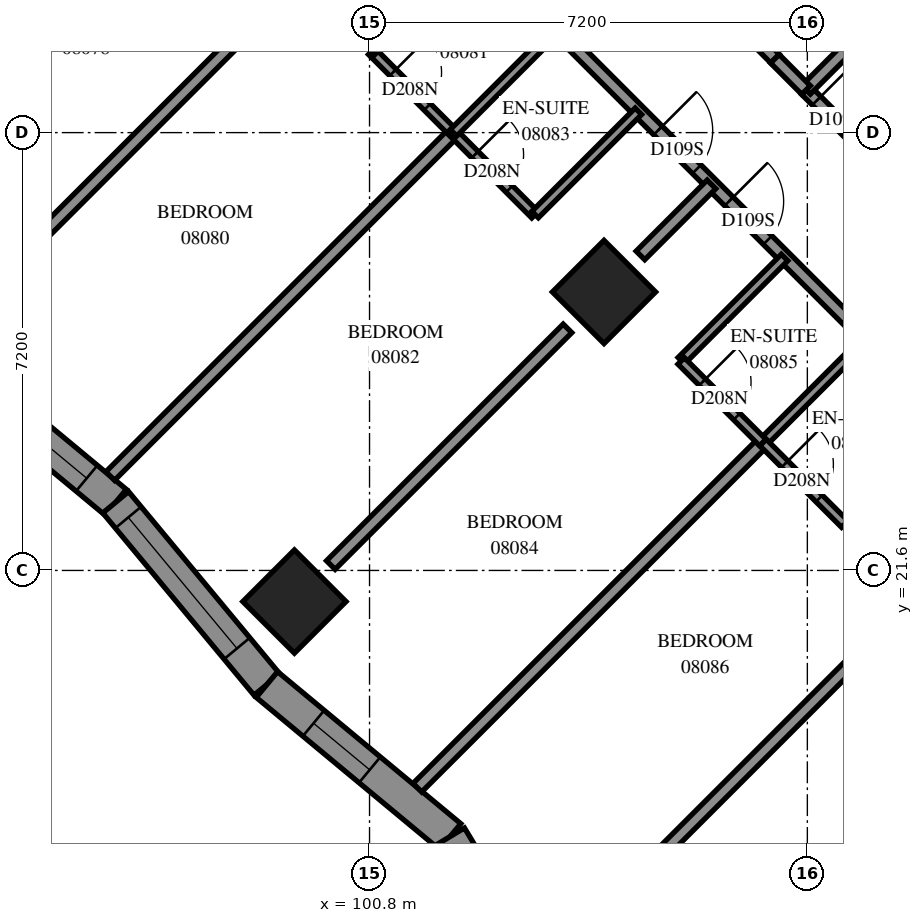
"""IFC4 building model, lengths in metres.
Left out: names, types, materials, properties, quantities, classifications, styles, units other than length and angle.
Written with IfcOpenShell. Run it as: python <this file> out.ifc"""

import sys

from ifc_helpers import new_model, si_unit, direction, frame, frame_2d, origin, origin_2d, place, context, subcontext, project, spatial, polyline, rectangle, outline, extrude, element, fill, save


model = new_model("IFC4")
c1 = context("Model", 3, precision=1e-05, world=origin(), true_north=direction((0.0, 1.0)))
c2 = subcontext(c1, "Body", "Model", "MODEL_VIEW")
j1 = project(units=[si_unit("LENGTHUNIT", "METRE"), si_unit("PLANEANGLEUNIT", "RADIAN")], contexts=[c1])
p1 = place(None, origin())
s1 = spatial("IfcSite", under=j1, at=p1, CompositionType="ELEMENT")
p2 = place(p1, origin())
s2 = spatial("IfcBuilding", under=s1, at=p2, CompositionType="ELEMENT")
p3 = place(p2, frame((0.0, 0.0, 33.8)))
s3 = spatial("IfcBuildingStorey", under=s2, at=p3, CompositionType="ELEMENT", Elevation=33.8)
for number, where, z_axis, x_axis in (
    (1, (104.656, 26.18, 0.0), (0.0, 0.0, 1.0), (0.707, -0.707, 0.0)),
    (2, (99.565, 21.088, 0.0), (0.0, 0.0, 1.0), (0.707, -0.707, 0.0)),
):
    element("IfcColumn", number, at=place(p3, frame(where, z_axis=z_axis, x_axis=x_axis)), inside=s3, PredefinedType="COLUMN", context=c2, shape_type="SweptSolid", body=[
        extrude(rectangle(XDim=1.2, YDim=1.2, at=origin_2d()), origin(), (0.0, 0.0, 1.0), 3.1),
    ])
p4 = place(p3, frame((93.629, 25.207, 0.0), z_axis=(0.0, 0.0, 1.0), x_axis=(0.7696065296, -0.6385184333, 0.0)))
e3 = element("IfcWall", 3, at=p4, inside=s3, PredefinedType="SOLIDWALL", context=c2, shape_type="SweptSolid", body=[
    extrude(outline(polyline([(-0.026, -0.275), (3.869, -0.275), (3.92, 0.275), (0.026, 0.275), (-0.026, -0.275)])), origin(), (0.0, 0.0, 1.0), 3.1),
])
p5 = place(p4, frame((0.475, 0.0, 0.5)))
e4 = element("IfcOpeningElement", 4, at=p5, cuts=e3, PredefinedType="OPENING", context=c2, shape_type="SweptSolid", body=[
    extrude(rectangle(XDim=2.8, YDim=2.45, at=frame_2d((1.4, 1.225))), frame((0.0, 0.285, 0.0), z_axis=(0.0, -1.0, 0.0), x_axis=(1.0, 0.0, 0.0)), (0.0, 0.0, 1.0), 0.57),
])
p6 = place(p3, frame((96.626, 22.721, 0.0), z_axis=(0.0, 0.0, 1.0), x_axis=(0.6385032238, -0.7696191482, 0.0)))
e5 = element("IfcWall", 5, at=p6, inside=s3, PredefinedType="SOLIDWALL", context=c2, shape_type="SweptSolid", body=[
    extrude(outline(polyline([(0.026, -0.275), (3.92, -0.275), (3.869, 0.275), (-0.026, 0.275), (0.026, -0.275)])), origin(), (0.0, 0.0, 1.0), 3.1),
])
p7 = place(p6, frame((0.323, 0.0, 0.5)))
e6 = element("IfcOpeningElement", 6, at=p7, cuts=e5, PredefinedType="OPENING", context=c2, shape_type="SweptSolid", body=[
    extrude(rectangle(XDim=2.8, YDim=2.45, at=frame_2d((1.4, 1.225))), frame((0.0, 0.285, 0.0), z_axis=(0.0, -1.0, 0.0), x_axis=(1.0, 0.0, 0.0)), (0.0, 0.0, 1.0), 0.57),
])
p8 = place(p3, frame((99.112, 19.724, 0.0), z_axis=(0.0, 0.0, 1.0), x_axis=(0.7696116293, -0.6385122866, 0.0)))
e7 = element("IfcWall", 7, at=p8, inside=s3, PredefinedType="SOLIDWALL", context=c2, shape_type="SweptSolid", body=[
    extrude(outline(polyline([(-0.026, -0.275), (3.869, -0.275), (3.962, 0.275), (0.026, 0.275), (-0.026, -0.275)])), origin(), (0.0, 0.0, 1.0), 3.1),
])
p9 = place(p8, frame((0.997, 0.0, 0.5)))
e8 = element("IfcOpeningElement", 8, at=p9, cuts=e7, PredefinedType="OPENING", context=c2, shape_type="SweptSolid", body=[
    extrude(rectangle(XDim=1.2, YDim=2.45, at=frame_2d((0.6, 1.225))), frame((0.0, 0.285, 0.0), z_axis=(0.0, -1.0, 0.0), x_axis=(1.0, 0.0, 0.0)), (0.0, 0.0, 1.0), 0.57),
])
p10 = place(p3, frame((102.125, 17.224, 0.0), z_axis=(0.0, 0.0, 1.0), x_axis=(0.5162476894, -0.8564393284, 0.0)))
e9 = element("IfcWall", 9, at=p10, inside=s3, PredefinedType="SOLIDWALL", context=c2, shape_type="SweptSolid", body=[
    extrude(outline(polyline([(0.047, -0.275), (4.042, -0.275), (3.592, 0.275), (-0.047, 0.275), (0.047, -0.275)])), origin(), (0.0, 0.0, 1.0), 3.1),
])
p11 = place(p10, frame((0.869, 0.0, 0.5)))
e10 = element("IfcOpeningElement", 10, at=p11, cuts=e9, PredefinedType="OPENING", context=c2, shape_type="SweptSolid", body=[
    extrude(rectangle(XDim=1.2, YDim=2.45, at=frame_2d((0.6, 1.225))), frame((0.0, 0.285, 0.0), z_axis=(0.0, -1.0, 0.0), x_axis=(1.0, 0.0, 0.0)), (0.0, 0.0, 1.0), 0.57),
])
p12 = place(p3, frame((102.609, 31.769, 0.0), z_axis=(0.0, 0.0, 1.0), x_axis=(0.7071067812, -0.7071067812, 0.0)))
e11 = element("IfcWall", 11, at=p12, inside=s3, PredefinedType="PARTITIONING", context=c2, shape_type="SweptSolid", body=[
    extrude(rectangle(XDim=10.723, YDim=0.2, at=frame_2d((5.361, 0.0))), origin(), (0.0, 0.0, 1.0), 3.1),
])
p13 = place(p12, frame((4.15, 0.0, 0.0)))
e12 = element("IfcOpeningElement", 12, at=p13, cuts=e11, PredefinedType="OPENING", context=c2, shape_type="SweptSolid", body=[
    extrude(rectangle(XDim=0.9, YDim=2.1, at=frame_2d((0.45, 1.05))), frame((0.0, 0.11, 0.0), z_axis=(0.0, -1.0, 0.0), x_axis=(1.0, 0.0, 0.0)), (0.0, 0.0, 1.0), 0.22),
])
p14 = place(p12, frame((5.8, 0.0, 0.0)))
e13 = element("IfcOpeningElement", 13, at=p14, cuts=e11, PredefinedType="OPENING", context=c2, shape_type="SweptSolid", body=[
    extrude(rectangle(XDim=0.9, YDim=2.1, at=frame_2d((0.45, 1.05))), frame((0.0, 0.11, 0.0), z_axis=(0.0, -1.0, 0.0), x_axis=(1.0, 0.0, 0.0)), (0.0, 0.0, 1.0), 0.22),
])
p15 = place(p3, frame((101.587, 18.028, 0.0), z_axis=(0.0, 0.0, 1.0), x_axis=(0.7072374716, 0.7069760666, 0.0)))
e14 = element("IfcWall", 14, at=p15, inside=s3, PredefinedType="PARTITIONING", context=c2, shape_type="SweptSolid", body=[
    extrude(rectangle(XDim=8.034, YDim=0.2, at=frame_2d((4.017, 0.0))), origin(), (0.0, 0.0, 1.0), 3.1),
])
p16 = place(p3, frame((96.536, 23.152, 0.0), z_axis=(0.0, 0.0, 1.0), x_axis=(0.7071067812, 0.7071067812, 0.0)))
e15 = element("IfcWall", 15, at=p16, inside=s3, PredefinedType="PARTITIONING", context=c2, shape_type="SweptSolid", body=[
    extrude(rectangle(XDim=7.983, YDim=0.2, at=frame_2d((3.991, 0.0))), origin(), (0.0, 0.0, 1.0), 3.1),
])
p17 = place(p3, frame((91.46, 28.252, 0.0), z_axis=(0.0, 0.0, 1.0), x_axis=(0.7072323194, 0.7069812206, 0.0)))
e16 = element("IfcWall", 16, at=p17, inside=s3, PredefinedType="PARTITIONING", context=c2, shape_type="SweptSolid", body=[
    extrude(rectangle(XDim=7.965, YDim=0.2, at=frame_2d((3.982, 0.0))), origin(), (0.0, 0.0, 1.0), 3.1),
])
p18 = place(p3, frame((107.977, 29.499, 0.0), z_axis=(0.0, 0.0, 1.0), x_axis=(0.7071067812, -0.7071067812, 0.0)))
e17 = element("IfcWall", 17, at=p18, inside=s3, PredefinedType="PARTITIONING", context=c2, shape_type="SweptSolid", body=[
    extrude(rectangle(XDim=7.198, YDim=0.2, at=frame_2d((3.599, 0.0))), origin(), (0.0, 0.0, 1.0), 3.1),
])
p19 = place(p18, frame((0.247, 0.0, 0.0)))
e18 = element("IfcOpeningElement", 18, at=p19, cuts=e17, PredefinedType="OPENING", context=c2, shape_type="SweptSolid", body=[
    extrude(rectangle(XDim=0.9, YDim=2.1, at=frame_2d((0.45, 1.05))), frame((0.0, 0.11, 0.0), z_axis=(0.0, -1.0, 0.0), x_axis=(1.0, 0.0, 0.0)), (0.0, 0.0, 1.0), 0.22),
])
p20 = place(p18, frame((5.899, 0.0, 0.0)))
e19 = element("IfcOpeningElement", 19, at=p20, cuts=e17, PredefinedType="OPENING", context=c2, shape_type="SweptSolid", body=[
    extrude(rectangle(XDim=0.9, YDim=2.1, at=frame_2d((0.45, 1.05))), frame((0.0, 0.11, 0.0), z_axis=(0.0, -1.0, 0.0), x_axis=(1.0, 0.0, 0.0)), (0.0, 0.0, 1.0), 0.22),
])
p21 = place(p3, frame((105.255, 16.599, 0.0), z_axis=(0.0, 0.0, 1.0), x_axis=(0.7071067812, 0.7071067812, 0.0)))
e20 = element("IfcWall", 20, at=p21, inside=s3, PredefinedType="PARTITIONING", context=c2, shape_type="SweptSolid", body=[
    extrude(rectangle(XDim=5.504, YDim=0.2, at=frame_2d((2.752, 0.0))), origin(), (0.0, 0.0, 1.0), 2.6),
])
p22 = place(p3, frame((100.163, 21.689, 0.0), z_axis=(0.0, 0.0, 1.0), x_axis=(0.7071067812, 0.7071067812, 0.0)))
e21 = element("IfcWall", 21, at=p22, inside=s3, PredefinedType="PARTITIONING", context=c2, shape_type="SweptSolid", body=[
    extrude(rectangle(XDim=5.504, YDim=0.2, at=frame_2d((2.752, 0.0))), origin(), (0.0, 0.0, 1.0), 3.1),
])
p23 = place(p3, frame((95.073, 26.781, 0.0), z_axis=(0.0, 0.0, 1.0), x_axis=(0.7071067812, 0.7071067812, 0.0)))
e22 = element("IfcWall", 22, at=p23, inside=s3, PredefinedType="PARTITIONING", context=c2, shape_type="SweptSolid", body=[
    extrude(rectangle(XDim=5.501, YDim=0.2, at=frame_2d((2.751, 0.0))), origin(), (0.0, 0.0, 1.0), 3.1),
])
p24 = place(p3, frame((100.836, 30.138, 0.0), z_axis=(0.0, 0.0, 1.0), x_axis=(0.7065802685, -0.7076329021, 0.0)))
e23 = element("IfcWall", 23, at=p24, inside=s3, PredefinedType="PARTITIONING", context=c2, shape_type="SweptSolid", body=[
    extrude(rectangle(XDim=3.8, YDim=0.15, at=frame_2d((1.9, 0.0))), origin(), (0.0, 0.0, 1.0), 3.1),
])
p25 = place(p24, frame((0.493, 0.0, 0.0)))
e24 = element("IfcOpeningElement", 24, at=p25, cuts=e23, PredefinedType="OPENING", context=c2, shape_type="SweptSolid", body=[
    extrude(rectangle(XDim=0.8, YDim=2.1, at=frame_2d((0.4, 1.05))), frame((0.0, 0.085, 0.0), z_axis=(0.0, -1.0, 0.0), x_axis=(1.0, 0.0, 0.0)), (0.0, 0.0, 1.0), 0.17),
])
p26 = place(p24, frame((2.402, 0.0, 0.0)))
e25 = element("IfcOpeningElement", 25, at=p26, cuts=e23, PredefinedType="OPENING", context=c2, shape_type="SweptSolid", body=[
    extrude(rectangle(XDim=0.8, YDim=2.1, at=frame_2d((0.4, 1.05))), frame((0.0, 0.085, 0.0), z_axis=(0.0, -1.0, 0.0), x_axis=(1.0, 0.0, 0.0)), (0.0, 0.0, 1.0), 0.17),
])
p27 = place(p3, frame((105.435, 32.049, 0.0), z_axis=(0.0, 0.0, 1.0), x_axis=(0.7074545101, -0.7067588812, 0.0)))
e26 = element("IfcWall", 26, at=p27, inside=s3, PredefinedType="PARTITIONING", context=c2, shape_type="SweptSolid", body=[
    extrude(rectangle(XDim=2.875, YDim=0.2, at=frame_2d((1.438, 0.0))), origin(), (0.0, 0.0, 1.0), 3.1),
])
for number, where, z_axis, x_axis in (
    (27, (103.523, 27.453, 0.0), (0.0, 0.0, 1.0), (0.707, 0.707, 0.0)),
    (28, (105.927, 25.049, 0.0), (0.0, 0.0, 1.0), (0.707, 0.707, 0.0)),
    (29, (107.271, 23.705, 0.0), (0.0, 0.0, 1.0), (0.707, 0.707, 0.0)),
):
    element("IfcWall", number, at=place(p3, frame(where, z_axis=z_axis, x_axis=x_axis)), inside=s3, PredefinedType="PARTITIONING", context=c2, shape_type="SweptSolid", body=[
        extrude(rectangle(XDim=2.401, YDim=0.15, at=frame_2d((1.201, 0.0))), origin(), (0.0, 0.0, 1.0), 3.1),
    ])
for number, where, z_axis, x_axis in (
    (30, (100.837, 30.141, 0.0), (0.0, 0.0, 1.0), (0.707, 0.707, 0.0)),
    (31, (108.615, 22.363, 0.0), (0.0, 0.0, 1.0), (0.707, 0.707, 0.0)),
    (32, (102.181, 28.797, 0.0), (0.0, 0.0, 1.0), (0.707, 0.707, 0.0)),
):
    element("IfcWall", number, at=place(p3, frame(where, z_axis=z_axis, x_axis=x_axis)), inside=s3, PredefinedType="PARTITIONING", context=c2, shape_type="SweptSolid", body=[
        extrude(rectangle(XDim=2.398, YDim=0.15, at=frame_2d((1.199, 0.0))), origin(), (0.0, 0.0, 1.0), 3.1),
    ])
p28 = place(p3, frame((105.925, 25.045, 0.0), z_axis=(0.0, 0.0, 1.0), x_axis=(0.7071067812, -0.7071067812, 0.0)))
e33 = element("IfcWall", 33, at=p28, inside=s3, PredefinedType="PARTITIONING", context=c2, shape_type="SweptSolid", body=[
    extrude(rectangle(XDim=1.901, YDim=0.15, at=frame_2d((0.95, 0.0))), origin(), (0.0, 0.0, 1.0), 3.1),
])
p29 = place(p28, frame((0.493, 0.0, 0.0)))
e34 = element("IfcOpeningElement", 34, at=p29, cuts=e33, PredefinedType="OPENING", context=c2, shape_type="SweptSolid", body=[
    extrude(rectangle(XDim=0.8, YDim=2.1, at=frame_2d((0.4, 1.05))), frame((0.0, 0.085, 0.0), z_axis=(0.0, -1.0, 0.0), x_axis=(1.0, 0.0, 0.0)), (0.0, 0.0, 1.0), 0.17),
])
p30 = place(p3, frame((107.272, 23.704, 0.0), z_axis=(0.0, 0.0, 1.0), x_axis=(0.7076330979, -0.7065800724, 0.0)))
e35 = element("IfcWall", 35, at=p30, inside=s3, PredefinedType="PARTITIONING", context=c2, shape_type="SweptSolid", body=[
    extrude(rectangle(XDim=1.899, YDim=0.15, at=frame_2d((0.95, 0.0))), origin(), (0.0, 0.0, 1.0), 3.1),
])
p31 = place(p30, frame((0.503, 0.0, 0.0)))
e36 = element("IfcOpeningElement", 36, at=p31, cuts=e35, PredefinedType="OPENING", context=c2, shape_type="SweptSolid", body=[
    extrude(rectangle(XDim=0.8, YDim=2.1, at=frame_2d((0.4, 1.05))), frame((0.0, 0.085, 0.0), z_axis=(0.0, -1.0, 0.0), x_axis=(1.0, 0.0, 0.0)), (0.0, 0.0, 1.0), 0.17),
])
for number, where, z_axis, x_axis in (
    (37, (105.255, 26.781, 0.0), (0.0, 0.0, 1.0), (0.707, 0.707, 0.0)),
    (38, (107.978, 29.504, 0.0), (0.0, 0.0, 1.0), (0.707, 0.707, 0.0)),
):
    element("IfcWall", number, at=place(p3, frame(where, z_axis=z_axis, x_axis=x_axis)), inside=s3, PredefinedType="PARTITIONING", context=c2, shape_type="SweptSolid", body=[
        extrude(rectangle(XDim=1.652, YDim=0.2, at=frame_2d((0.826, 0.0))), origin(), (0.0, 0.0, 1.0), 3.1),
    ])
p32 = place(p3, frame((107.466, 30.014, 0.0), z_axis=(0.0, 0.0, 1.0), x_axis=(0.7057270646, -0.7084838109, 0.0)))
e39 = element("IfcWall", 39, at=p32, inside=s3, PredefinedType="PARTITIONING", context=c2, shape_type="SweptSolid", body=[
    extrude(rectangle(XDim=0.726, YDim=0.2, at=frame_2d((0.363, 0.0))), origin(), (0.0, 0.0, 1.0), 3.1),
])
p33 = place(p5, origin())
e40 = element("IfcWindow", 40, at=p33, inside=s3, PartitioningType="SINGLE_PANEL", PredefinedType="WINDOW", context=c2, shape_type="SweptSolid", body=[
    extrude(rectangle(XDim=2.8, YDim=2.45, at=frame_2d((1.4, 1.225))), frame((0.0, 0.155, 0.0), z_axis=(0.0, -1.0, 0.0), x_axis=(1.0, 0.0, 0.0)), (0.0, 0.0, 1.0), 0.06),
])
fill(e4, e40)
p34 = place(p7, origin())
e41 = element("IfcWindow", 41, at=p34, inside=s3, PartitioningType="SINGLE_PANEL", PredefinedType="WINDOW", context=c2, shape_type="SweptSolid", body=[
    extrude(rectangle(XDim=2.8, YDim=2.45, at=frame_2d((1.4, 1.225))), frame((0.0, 0.155, 0.0), z_axis=(0.0, -1.0, 0.0), x_axis=(1.0, 0.0, 0.0)), (0.0, 0.0, 1.0), 0.06),
])
fill(e6, e41)
p35 = place(p9, origin())
e42 = element("IfcWindow", 42, at=p35, inside=s3, PartitioningType="SINGLE_PANEL", PredefinedType="WINDOW", context=c2, shape_type="SweptSolid", body=[
    extrude(rectangle(XDim=1.2, YDim=2.45, at=frame_2d((0.6, 1.225))), frame((0.0, 0.155, 0.0), z_axis=(0.0, -1.0, 0.0), x_axis=(1.0, 0.0, 0.0)), (0.0, 0.0, 1.0), 0.06),
])
fill(e8, e42)
p36 = place(p19, origin())
e43 = element("IfcDoor", 43, at=p36, inside=s3, OperationType="SINGLE_SWING_LEFT", PredefinedType="DOOR", context=c2, shape_type="SweptSolid", body=[
    extrude(rectangle(XDim=0.9, YDim=2.1, at=frame_2d((0.45, 1.05))), frame((0.0, 0.025, 0.0), z_axis=(0.0, -1.0, 0.0), x_axis=(1.0, 0.0, 0.0)), (0.0, 0.0, 1.0), 0.05),
])
fill(e18, e43)
p37 = place(p25, origin())
e44 = element("IfcDoor", 44, at=p37, inside=s3, OperationType="SINGLE_SWING_RIGHT", PredefinedType="DOOR", context=c2, shape_type="SweptSolid", body=[
    extrude(rectangle(XDim=0.8, YDim=2.1, at=frame_2d((0.4, 1.05))), frame((0.0, 0.025, 0.0), z_axis=(0.0, -1.0, 0.0), x_axis=(1.0, 0.0, 0.0)), (0.0, 0.0, 1.0), 0.05),
])
fill(e24, e44)
p38 = place(p13, origin())
e45 = element("IfcDoor", 45, at=p38, inside=s3, OperationType="SINGLE_SWING_LEFT", PredefinedType="DOOR", context=c2, shape_type="SweptSolid", body=[
    extrude(rectangle(XDim=0.9, YDim=2.1, at=frame_2d((0.45, 1.05))), frame((0.0, 0.025, 0.0), z_axis=(0.0, -1.0, 0.0), x_axis=(1.0, 0.0, 0.0)), (0.0, 0.0, 1.0), 0.05),
])
fill(e12, e45)
p39 = place(p26, origin())
e46 = element("IfcDoor", 46, at=p39, inside=s3, OperationType="SINGLE_SWING_RIGHT", PredefinedType="DOOR", context=c2, shape_type="SweptSolid", body=[
    extrude(rectangle(XDim=0.8, YDim=2.1, at=frame_2d((0.4, 1.05))), frame((0.0, 0.025, 0.0), z_axis=(0.0, -1.0, 0.0), x_axis=(1.0, 0.0, 0.0)), (0.0, 0.0, 1.0), 0.05),
])
fill(e25, e46)
p40 = place(p14, origin())
e47 = element("IfcDoor", 47, at=p40, inside=s3, OperationType="SINGLE_SWING_RIGHT", PredefinedType="DOOR", context=c2, shape_type="SweptSolid", body=[
    extrude(rectangle(XDim=0.9, YDim=2.1, at=frame_2d((0.45, 1.05))), frame((0.0, 0.025, 0.0), z_axis=(0.0, -1.0, 0.0), x_axis=(1.0, 0.0, 0.0)), (0.0, 0.0, 1.0), 0.05),
])
fill(e13, e47)
p41 = place(p29, origin())
e48 = element("IfcDoor", 48, at=p41, inside=s3, OperationType="SINGLE_SWING_RIGHT", PredefinedType="DOOR", context=c2, shape_type="SweptSolid", body=[
    extrude(rectangle(XDim=0.8, YDim=2.1, at=frame_2d((0.4, 1.05))), frame((0.0, 0.025, 0.0), z_axis=(0.0, -1.0, 0.0), x_axis=(1.0, 0.0, 0.0)), (0.0, 0.0, 1.0), 0.05),
])
fill(e34, e48)
p42 = place(p31, origin())
e49 = element("IfcDoor", 49, at=p42, inside=s3, OperationType="SINGLE_SWING_RIGHT", PredefinedType="DOOR", context=c2, shape_type="SweptSolid", body=[
    extrude(rectangle(XDim=0.8, YDim=2.1, at=frame_2d((0.4, 1.05))), frame((0.0, 0.025, 0.0), z_axis=(0.0, -1.0, 0.0), x_axis=(1.0, 0.0, 0.0)), (0.0, 0.0, 1.0), 0.05),
])
fill(e36, e49)
save(model, sys.argv[1])
